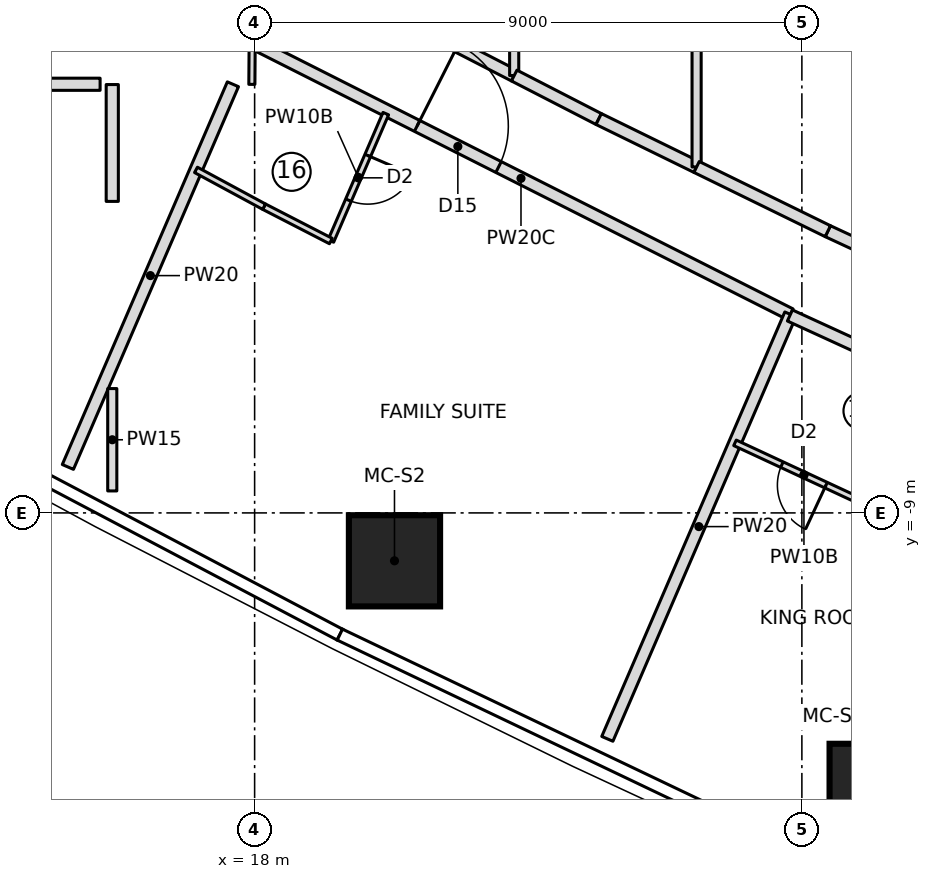
"""IFC4 building model, lengths in metres.
Left out: names, types, materials, properties, quantities, classifications, styles, units other than length and angle.
Written with IfcOpenShell. Run it as: python <this file> out.ifc"""

import sys

from ifc_helpers import new_model, si_unit, direction, frame, frame_2d, origin, origin_2d, place, context, subcontext, project, spatial, rectangle, extrude, element, fill, save


model = new_model("IFC4")
c1 = context("Model", 3, precision=1e-05, world=origin(), true_north=direction((0.0, 1.0)))
c2 = subcontext(c1, "Body", "Model", "MODEL_VIEW")
j1 = project(units=[si_unit("LENGTHUNIT", "METRE"), si_unit("PLANEANGLEUNIT", "RADIAN")], contexts=[c1])
p1 = place(None, origin())
s1 = spatial("IfcSite", under=j1, at=p1, CompositionType="ELEMENT")
p2 = place(p1, origin())
s2 = spatial("IfcBuilding", under=s1, at=p2, CompositionType="ELEMENT")
p3 = place(p2, frame((0.0, 0.0, 130.2)))
s3 = spatial("IfcBuildingStorey", under=s2, at=p3, CompositionType="ELEMENT", Elevation=130.2)
for number, where, z_axis, x_axis in (
    (1, (20.3, -9.788, 0.0), (0.0, 0.0, 1.0), (1.0, 0.0, 0.0)),
    (2, (28.205, -13.547, 0.0), (0.0, 0.0, 1.0), (1.0, 0.0, 0.0)),
):
    element("IfcColumn", number, at=place(p3, frame(where, z_axis=z_axis, x_axis=x_axis)), inside=s3, PredefinedType="COLUMN", context=c2, shape_type="SweptSolid", body=[
        extrude(rectangle(XDim=1.5, YDim=1.5, at=origin_2d()), origin(), (0.0, 0.0, 1.0), 3.55),
    ])
p4 = place(p3, frame((5.654, -1.95, 0.0), z_axis=(0.0, 0.0, 1.0), x_axis=(1.0, 0.0, 0.0)))
e3 = element("IfcWall", 3, at=p4, inside=s3, PredefinedType="PARTITIONING", context=c2, shape_type="SweptSolid", body=[
    extrude(rectangle(XDim=9.804, YDim=0.2, at=frame_2d((4.902, 0.0))), origin(), (0.0, 0.0, 1.0), 3.25),
])
p5 = place(p4, frame((4.618, 0.0, 0.0)))
e4 = element("IfcOpeningElement", 4, at=p5, cuts=e3, PredefinedType="OPENING", context=c2, shape_type="SweptSolid", body=[
    extrude(rectangle(XDim=1.0, YDim=2.1, at=frame_2d((0.5, 1.05))), frame((0.0, 0.11, 0.0), z_axis=(0.0, -1.0, 0.0), x_axis=(1.0, 0.0, 0.0)), (0.0, 0.0, 1.0), 0.22),
])
p6 = place(p3, frame((14.929, -8.244, 0.0), z_axis=(0.0, 0.0, 1.0), x_axis=(0.395994543879, 0.918252863441, 0.0)))
e5 = element("IfcWall", 5, at=p6, inside=s3, PredefinedType="PARTITIONING", context=c2, shape_type="SweptSolid", body=[
    extrude(rectangle(XDim=6.854, YDim=0.2, at=frame_2d((3.427, 0.0))), origin(), (0.0, 0.0, 1.0), 3.25),
])
p7 = place(p3, frame((17.95, -1.261, 0.0), z_axis=(0.0, 0.0, 1.0), x_axis=(0.892679126003, -0.450692775623, 0.0)))
e6 = element("IfcWall", 6, at=p7, inside=s3, PredefinedType="PARTITIONING", context=c2, shape_type="SweptSolid", body=[
    extrude(rectangle(XDim=9.927, YDim=0.2, at=frame_2d((4.963, 0.0))), origin(), (0.0, 0.0, 1.0), 3.25),
])
p8 = place(p7, frame((3.05, 0.0, 0.0)))
e7 = element("IfcOpeningElement", 7, at=p8, cuts=e6, PredefinedType="OPENING", context=c2, shape_type="SweptSolid", body=[
    extrude(rectangle(XDim=1.5, YDim=2.1, at=frame_2d((0.75, 1.05))), frame((0.0, 0.11, 0.0), z_axis=(0.0, -1.0, 0.0), x_axis=(1.0, 0.0, 0.0)), (0.0, 0.0, 1.0), 0.22),
])
p9 = place(p3, frame((20.157, -2.433, 0.0), z_axis=(0.0, 0.0, 1.0), x_axis=(-0.395958457437, -0.9182684248, 0.0)))
e8 = element("IfcWall", 8, at=p9, inside=s3, PredefinedType="PARTITIONING", context=c2, shape_type="SweptSolid", body=[
    extrude(rectangle(XDim=2.282, YDim=0.1, at=frame_2d((1.141, 0.0))), origin(), (0.0, 0.0, 1.0), 3.25),
])
p10 = place(p9, frame((0.75, 0.0, 0.0)))
e9 = element("IfcOpeningElement", 9, at=p10, cuts=e8, PredefinedType="OPENING", context=c2, shape_type="SweptSolid", body=[
    extrude(rectangle(XDim=0.8, YDim=2.1, at=frame_2d((0.4, 1.05))), frame((0.0, 0.06, 0.0), z_axis=(0.0, -1.0, 0.0), x_axis=(1.0, 0.0, 0.0)), (0.0, 0.0, 1.0), 0.12),
])
p11 = place(p3, frame((19.253, -4.529, 0.0), z_axis=(0.0, 0.0, 1.0), x_axis=(-0.889106231322, 0.457700895154, 0.0)))
e10 = element("IfcWall", 10, at=p11, inside=s3, PredefinedType="PARTITIONING", context=c2, shape_type="SweptSolid", body=[
    extrude(rectangle(XDim=1.235, YDim=0.1, at=frame_2d((0.617, 0.0))), origin(), (0.0, 0.0, 1.0), 3.25),
])
p12 = place(p3, frame((18.156, -3.963, 0.0), z_axis=(0.0, 0.0, 1.0), x_axis=(-0.879823588489, 0.475300382009, 0.0)))
e11 = element("IfcWall", 11, at=p12, inside=s3, PredefinedType="PARTITIONING", context=c2, shape_type="SweptSolid", body=[
    extrude(rectangle(XDim=1.273, YDim=0.1, at=frame_2d((0.636, 0.0))), origin(), (0.0, 0.0, 1.0), 3.25),
])
p13 = place(p3, frame((23.801, -12.716, 0.0), z_axis=(0.0, 0.0, 1.0), x_axis=(0.395995556294, 0.918252426839, 0.0)))
e12 = element("IfcWall", 12, at=p13, inside=s3, PredefinedType="PARTITIONING", context=c2, shape_type="SweptSolid", body=[
    extrude(rectangle(XDim=7.603, YDim=0.2, at=frame_2d((3.802, 0.0))), origin(), (0.0, 0.0, 1.0), 3.25),
])
p14 = place(p3, frame((26.803, -5.753, 0.0), z_axis=(0.0, 0.0, 1.0), x_axis=(0.90910092787, -0.416575926987, 0.0)))
e13 = element("IfcWall", 13, at=p14, inside=s3, PredefinedType="PARTITIONING", context=c2, shape_type="SweptSolid", body=[
    extrude(rectangle(XDim=4.375, YDim=0.2, at=frame_2d((2.188, 0.0))), origin(), (0.0, 0.0, 1.0), 3.25),
])
p15 = place(p14, frame((3.05, 0.0, 0.0)))
e14 = element("IfcOpeningElement", 14, at=p15, cuts=e13, PredefinedType="OPENING", context=c2, shape_type="SweptSolid", body=[
    extrude(rectangle(XDim=1.0, YDim=2.1, at=frame_2d((0.5, 1.05))), frame((0.0, 0.11, 0.0), z_axis=(0.0, -1.0, 0.0), x_axis=(1.0, 0.0, 0.0)), (0.0, 0.0, 1.0), 0.22),
])
p16 = place(p3, frame((28.168, -8.902, 0.0), z_axis=(0.0, 0.0, 1.0), x_axis=(-0.906813113059, 0.421532890751, 0.0)))
e15 = element("IfcWall", 15, at=p16, inside=s3, PredefinedType="PARTITIONING", context=c2, shape_type="SweptSolid", body=[
    extrude(rectangle(XDim=2.501, YDim=0.1, at=frame_2d((1.25, 0.0))), origin(), (0.0, 0.0, 1.0), 3.25),
])
p17 = place(p16, frame((0.85, 0.0, 0.0)))
e16 = element("IfcOpeningElement", 16, at=p17, cuts=e15, PredefinedType="OPENING", context=c2, shape_type="SweptSolid", body=[
    extrude(rectangle(XDim=0.8, YDim=2.1, at=frame_2d((0.4, 1.05))), frame((0.0, 0.06, 0.0), z_axis=(0.0, -1.0, 0.0), x_axis=(1.0, 0.0, 0.0)), (0.0, 0.0, 1.0), 0.12),
])
p18 = place(p3, frame((27.771, -14.554, 0.0), z_axis=(0.0, 0.0, 1.0), x_axis=(0.396004020147, 0.918248776763, 0.0)))
e17 = element("IfcWall", 17, at=p18, inside=s3, PredefinedType="PARTITIONING", context=c2, shape_type="SweptSolid", body=[
    extrude(rectangle(XDim=7.6, YDim=0.2, at=frame_2d((3.8, 0.0))), origin(), (0.0, 0.0, 1.0), 3.25),
])
p19 = place(p3, frame((22.269, -1.807, 0.0), z_axis=(0.0, 0.0, 1.0), x_axis=(-0.889134700325, 0.457645588505, 0.0)))
e18 = element("IfcWall", 18, at=p19, inside=s3, PredefinedType="PARTITIONING", context=c2, shape_type="SweptSolid", body=[
    extrude(rectangle(XDim=2.632, YDim=0.2, at=frame_2d((1.316, 0.0))), origin(), (0.0, 0.0, 1.0), 3.25),
])
p20 = place(p3, frame((22.269, -1.807, 0.0), z_axis=(0.0, 0.0, 1.0), x_axis=(0.0, 1.0, 0.0)))
e19 = element("IfcWall", 19, at=p20, inside=s3, PredefinedType="PARTITIONING", context=c2, shape_type="SweptSolid", body=[
    extrude(rectangle(XDim=3.613, YDim=0.15, at=frame_2d((1.807, 0.0))), origin(), (0.0, 0.0, 1.0), 3.25),
])
p21 = place(p3, frame((23.659, -2.522, 0.0), z_axis=(0.0, 0.0, 1.0), x_axis=(-0.88914982879, 0.457616195039, 0.0)))
e20 = element("IfcWall", 20, at=p21, inside=s3, PredefinedType="PARTITIONING", context=c2, shape_type="SweptSolid", body=[
    extrude(rectangle(XDim=1.563, YDim=0.2, at=frame_2d((0.782, 0.0))), origin(), (0.0, 0.0, 1.0), 3.25),
])
p22 = place(p3, frame((25.269, -3.31, 0.0), z_axis=(0.0, 0.0, 1.0), x_axis=(-0.898127473276, 0.439735195028, 0.0)))
e21 = element("IfcWall", 21, at=p22, inside=s3, PredefinedType="PARTITIONING", context=c2, shape_type="SweptSolid", body=[
    extrude(rectangle(XDim=1.793, YDim=0.2, at=frame_2d((0.896, 0.0))), origin(), (0.0, 0.0, 1.0), 3.25),
])
p23 = place(p3, frame((25.269, -3.31, 0.0), z_axis=(0.0, 0.0, 1.0), x_axis=(0.0, 1.0, 0.0)))
e22 = element("IfcWall", 22, at=p23, inside=s3, PredefinedType="PARTITIONING", context=c2, shape_type="SweptSolid", body=[
    extrude(rectangle(XDim=6.621, YDim=0.15, at=frame_2d((3.31, 0.0))), origin(), (0.0, 0.0, 1.0), 3.25),
])
p24 = place(p3, frame((31.231, -6.135, 0.0), z_axis=(0.0, 0.0, 1.0), x_axis=(-0.906830275285, 0.421495968933, 0.0)))
e23 = element("IfcWall", 23, at=p24, inside=s3, PredefinedType="PARTITIONING", context=c2, shape_type="SweptSolid", body=[
    extrude(rectangle(XDim=4.195, YDim=0.2, at=frame_2d((2.098, 0.0))), origin(), (0.0, 0.0, 1.0), 3.25),
])
p25 = place(p3, frame((27.427, -4.367, 0.0), z_axis=(0.0, 0.0, 1.0), x_axis=(-0.898155255728, 0.439678446831, 0.0)))
e24 = element("IfcWall", 24, at=p25, inside=s3, PredefinedType="PARTITIONING", context=c2, shape_type="SweptSolid", body=[
    extrude(rectangle(XDim=2.403, YDim=0.2, at=frame_2d((1.201, 0.0))), origin(), (0.0, 0.0, 1.0), 3.25),
])
p26 = place(p3, frame((15.659, -6.955, 0.0), z_axis=(0.0, 0.0, 1.0), x_axis=(0.0, -1.0, 0.0)))
e25 = element("IfcWall", 25, at=p26, inside=s3, PredefinedType="PARTITIONING", context=c2, shape_type="SweptSolid", body=[
    extrude(rectangle(XDim=1.684, YDim=0.15, at=frame_2d((0.842, 0.0))), origin(), (0.0, 0.0, 1.0), 3.25),
])
p27 = place(p3, frame((17.955, -1.952, 0.0), z_axis=(0.0, 0.0, 1.0), x_axis=(0.007291472831, 0.999973416859, 0.0)))
e26 = element("IfcWall", 26, at=p27, inside=s3, PredefinedType="PARTITIONING", context=c2, shape_type="SweptSolid", body=[
    extrude(rectangle(XDim=0.703, YDim=0.1, at=frame_2d((0.352, 0.0))), origin(), (0.0, 0.0, 1.0), 3.25),
])
p28 = place(p3, frame((15.659, -1.955, 0.0), z_axis=(0.0, 0.0, 1.0), x_axis=(0.0, -1.0, 0.0)))
e27 = element("IfcWall", 27, at=p28, inside=s3, PredefinedType="PARTITIONING", context=c2, shape_type="SweptSolid", body=[
    extrude(rectangle(XDim=1.922, YDim=0.2, at=frame_2d((0.961, 0.0))), origin(), (0.0, 0.0, 1.0), 3.25),
])
p29 = place(p10, origin())
e28 = element("IfcDoor", 28, at=p29, inside=s3, OperationType="SINGLE_SWING_LEFT", PredefinedType="DOOR", context=c2, shape_type="SweptSolid", body=[
    extrude(rectangle(XDim=0.8, YDim=2.1, at=frame_2d((0.4, 1.05))), frame((0.0, 0.025, 0.0), z_axis=(0.0, -1.0, 0.0), x_axis=(1.0, 0.0, 0.0)), (0.0, 0.0, 1.0), 0.05),
])
fill(e9, e28)
p30 = place(p8, origin())
e29 = element("IfcDoor", 29, at=p30, inside=s3, OperationType="DOUBLE_DOOR_SINGLE_SWING", PredefinedType="DOOR", context=c2, shape_type="SweptSolid", body=[
    extrude(rectangle(XDim=1.5, YDim=2.1, at=frame_2d((0.75, 1.05))), frame((0.0, 0.025, 0.0), z_axis=(0.0, -1.0, 0.0), x_axis=(1.0, 0.0, 0.0)), (0.0, 0.0, 1.0), 0.05),
])
fill(e7, e29)
p31 = place(p17, origin())
e30 = element("IfcDoor", 30, at=p31, inside=s3, OperationType="SINGLE_SWING_LEFT", PredefinedType="DOOR", context=c2, shape_type="SweptSolid", body=[
    extrude(rectangle(XDim=0.8, YDim=2.1, at=frame_2d((0.4, 1.05))), frame((0.0, 0.025, 0.0), z_axis=(0.0, -1.0, 0.0), x_axis=(1.0, 0.0, 0.0)), (0.0, 0.0, 1.0), 0.05),
])
fill(e16, e30)
save(model, sys.argv[1])
